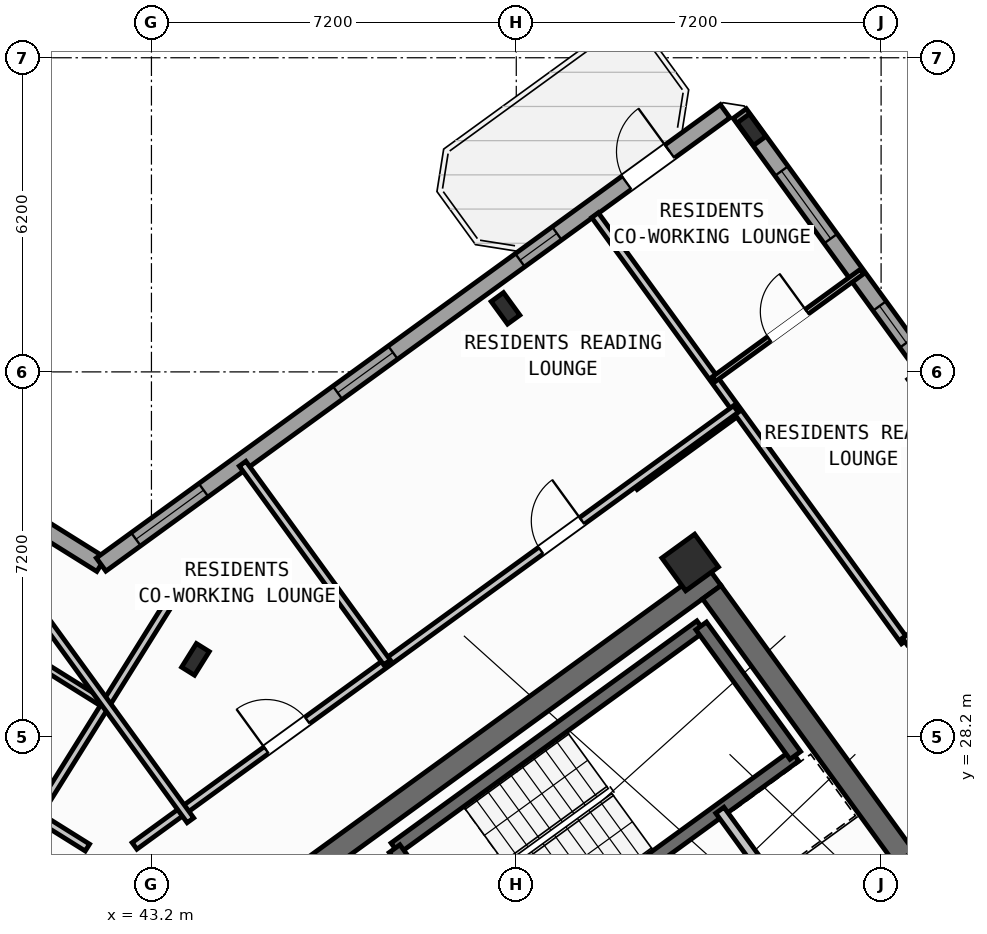
"""IFC4 building model, lengths in metres.
Left out: names, types, materials, properties, quantities, classifications, styles, units other than length and angle.
Written with IfcOpenShell. Run it as: python <this file> out.ifc"""

import sys

from ifc_helpers import new_model, si_unit, direction, frame, frame_2d, origin, origin_2d, place, context, subcontext, project, spatial, rectangle, hollow_rectangle, i_section, extrude, source, transform, mapped, element, fill, save


model = new_model("IFC4")
c1 = context("Model", 3, precision=1e-05, world=origin(), true_north=direction((0.0, 1.0)))
c2 = subcontext(c1, "Body", "Model", "MODEL_VIEW")
j1 = project(units=[si_unit("LENGTHUNIT", "METRE"), si_unit("PLANEANGLEUNIT", "RADIAN")], contexts=[c1])
p1 = place(None, origin())
s1 = spatial("IfcSite", under=j1, at=p1, CompositionType="ELEMENT")
p2 = place(p1, origin())
s2 = spatial("IfcBuilding", under=s1, at=p2, CompositionType="ELEMENT")
p3 = place(p2, frame((0.0, 0.0, 207.6)))
s3 = spatial("IfcBuildingStorey", under=s2, at=p3, CompositionType="ELEMENT", Elevation=207.6)
p4 = place(p3, frame((44.406, 24.172, 0.0), z_axis=(0.0, 0.0, 1.0), x_axis=(0.809012867805, 0.587790931986, 0.0)))
e1 = element("IfcWall", 1, at=p4, inside=s3, PredefinedType="SHEAR", context=c2, shape_type="SweptSolid", body=[
    extrude(rectangle(XDim=12.24, YDim=0.45, at=frame_2d((6.12, 0.0))), origin(), (0.0, 0.0, 1.0), 3.35),
])
p5 = place(p3, frame((58.064, 25.813, 0.0), z_axis=(0.0, 0.0, 1.0), x_axis=(-0.587774812919, 0.809024578921, 0.0)))
e2 = element("IfcWall", 2, at=p5, inside=s3, PredefinedType="SHEAR", context=c2, shape_type="SweptSolid", body=[
    extrude(rectangle(XDim=6.475, YDim=0.45, at=frame_2d((3.238, 0.0))), origin(), (0.0, 0.0, 1.0), 3.35),
])
m1 = source(origin(), c2, "Body", "SweptSolid", [
    extrude(i_section(OverallWidth=0.3, OverallDepth=0.55, WebThickness=0.015, FlangeThickness=0.029, at=origin_2d()), origin(), (0.0, 0.0, 1.0), 3.6),
])
p6 = place(p3, frame((44.068, 29.726, 0.0), z_axis=(0.0, 0.0, 1.0), x_axis=(-0.848048096156, 0.529919264233, 0.0)))
e3 = element("IfcColumn", 3, at=p6, inside=s3, PredefinedType="COLUMN", context=c2, shape_type="MappedRepresentation", body=[
    mapped(m1, transform((0.0, 0.0, 0.0), scale=1.0)),
])
m2 = source(origin(), c2, "Body", "SweptSolid", [
    extrude(hollow_rectangle(XDim=0.8, YDim=0.8, WallThickness=0.032, at=origin_2d()), origin(), (0.0, 0.0, 1.0), 3.6),
])
p7 = place(p3, frame((53.832, 31.638, 0.0), z_axis=(0.0, 0.0, 1.0), x_axis=(0.809016994375, 0.587785252292, 0.0)))
e4 = element("IfcColumn", 4, at=p7, inside=s3, PredefinedType="COLUMN", context=c2, shape_type="MappedRepresentation", body=[
    mapped(m2, transform((0.0, 0.0, 0.0), scale=1.0)),
])
for number, where, z_axis, x_axis in (
    (5, (50.188, 36.654, 0.0), (0.0, 0.0, 1.0), (0.809, 0.588, 0.0)),
    (6, (55.042, 40.181, 0.0), (0.0, 0.0, 1.0), (0.809, 0.588, 0.0)),
):
    element("IfcColumn", number, at=place(p3, frame(where, z_axis=z_axis, x_axis=x_axis)), inside=s3, PredefinedType="COLUMN", context=c2, shape_type="MappedRepresentation", body=[
        mapped(m1, transform((0.0, 0.0, 0.0), scale=1.0)),
    ])
p8 = place(p3, frame((17.424, 47.083, 0.0), z_axis=(0.0, 0.0, 1.0), x_axis=(0.848049927979, -0.529916332693, 0.0)))
e7 = element("IfcWall", 7, at=p8, inside=s3, PredefinedType="STANDARD", context=c2, shape_type="SweptSolid", body=[
    extrude(rectangle(XDim=29.223, YDim=0.32, at=frame_2d((14.612, 0.0))), origin(), (0.0, 0.0, 1.0), 3.35),
])
p9 = place(p8, frame((2.526, 0.0, 0.0)))
e8 = element("IfcOpeningElement", 8, at=p9, cuts=e7, PredefinedType="OPENING", context=c2, shape_type="SweptSolid", body=[
    extrude(rectangle(XDim=1.05, YDim=2.15, at=frame_2d((0.525, 1.075))), frame((0.0, 0.17, 0.0), z_axis=(0.0, -1.0, 0.0), x_axis=(1.0, 0.0, 0.0)), (0.0, 0.0, 1.0), 0.34),
])
p10 = place(p8, frame((0.653, 0.0, 0.9)))
e9 = element("IfcOpeningElement", 9, at=p10, cuts=e7, PredefinedType="OPENING", context=c2, shape_type="SweptSolid", body=[
    extrude(rectangle(XDim=1.35, YDim=1.45, at=frame_2d((0.675, 0.725))), frame((0.0, 0.17, 0.0), z_axis=(0.0, -1.0, 0.0), x_axis=(1.0, 0.0, 0.0)), (0.0, 0.0, 1.0), 0.34),
])
p11 = place(p8, frame((6.897, 0.0, 1.0)))
e10 = element("IfcOpeningElement", 10, at=p11, cuts=e7, PredefinedType="OPENING", context=c2, shape_type="SweptSolid", body=[
    extrude(rectangle(XDim=0.9, YDim=1.25, at=frame_2d((0.45, 0.625))), frame((0.0, 0.17, 0.0), z_axis=(0.0, -1.0, 0.0), x_axis=(1.0, 0.0, 0.0)), (0.0, 0.0, 1.0), 0.34),
])
p12 = place(p8, frame((9.602, 0.0, 0.95)))
e11 = element("IfcOpeningElement", 11, at=p12, cuts=e7, PredefinedType="OPENING", context=c2, shape_type="SweptSolid", body=[
    extrude(rectangle(XDim=1.95, YDim=1.35, at=frame_2d((0.975, 0.675))), frame((0.0, 0.17, 0.0), z_axis=(0.0, -1.0, 0.0), x_axis=(1.0, 0.0, 0.0)), (0.0, 0.0, 1.0), 0.34),
])
p13 = place(p8, frame((14.096, 0.0, 1.0)))
e12 = element("IfcOpeningElement", 12, at=p13, cuts=e7, PredefinedType="OPENING", context=c2, shape_type="SweptSolid", body=[
    extrude(rectangle(XDim=0.9, YDim=1.25, at=frame_2d((0.45, 0.625))), frame((0.0, 0.17, 0.0), z_axis=(0.0, -1.0, 0.0), x_axis=(1.0, 0.0, 0.0)), (0.0, 0.0, 1.0), 0.34),
])
p14 = place(p8, frame((17.254, 0.0, 1.0)))
e13 = element("IfcOpeningElement", 13, at=p14, cuts=e7, PredefinedType="OPENING", context=c2, shape_type="SweptSolid", body=[
    extrude(rectangle(XDim=0.9, YDim=1.25, at=frame_2d((0.45, 0.625))), frame((0.0, 0.17, 0.0), z_axis=(0.0, -1.0, 0.0), x_axis=(1.0, 0.0, 0.0)), (0.0, 0.0, 1.0), 0.34),
])
p15 = place(p8, frame((21.139, 0.0, 0.9)))
e14 = element("IfcOpeningElement", 14, at=p15, cuts=e7, PredefinedType="OPENING", context=c2, shape_type="SweptSolid", body=[
    extrude(rectangle(XDim=1.35, YDim=1.45, at=frame_2d((0.675, 0.725))), frame((0.0, 0.17, 0.0), z_axis=(0.0, -1.0, 0.0), x_axis=(1.0, 0.0, 0.0)), (0.0, 0.0, 1.0), 0.34),
])
p16 = place(p8, frame((25.778, 0.0, 0.9)))
e15 = element("IfcOpeningElement", 15, at=p16, cuts=e7, PredefinedType="OPENING", context=c2, shape_type="SweptSolid", body=[
    extrude(rectangle(XDim=1.35, YDim=1.45, at=frame_2d((0.675, 0.725))), frame((0.0, 0.17, 0.0), z_axis=(0.0, -1.0, 0.0), x_axis=(1.0, 0.0, 0.0)), (0.0, 0.0, 1.0), 0.34),
])
p17 = place(p3, frame((42.207, 31.597, 0.0), z_axis=(0.0, 0.0, 1.0), x_axis=(0.809020333377, 0.587780656523, 0.0)))
e16 = element("IfcWall", 16, at=p17, inside=s3, PredefinedType="STANDARD", context=c2, shape_type="SweptSolid", body=[
    extrude(rectangle(XDim=15.223, YDim=0.32, at=frame_2d((7.611, 0.0))), origin(), (0.0, 0.0, 1.0), 3.35),
])
p18 = place(p17, frame((12.82, 0.0, 0.0)))
e17 = element("IfcOpeningElement", 17, at=p18, cuts=e16, PredefinedType="OPENING", context=c2, shape_type="SweptSolid", body=[
    extrude(rectangle(XDim=1.05, YDim=2.15, at=frame_2d((0.525, 1.075))), frame((0.0, 0.17, 0.0), z_axis=(0.0, -1.0, 0.0), x_axis=(1.0, 0.0, 0.0)), (0.0, 0.0, 1.0), 0.34),
])
p19 = place(p17, frame((0.85, 0.0, 0.9)))
e18 = element("IfcOpeningElement", 18, at=p19, cuts=e16, PredefinedType="OPENING", context=c2, shape_type="SweptSolid", body=[
    extrude(rectangle(XDim=1.65, YDim=1.45, at=frame_2d((0.825, 0.725))), frame((0.0, 0.17, 0.0), z_axis=(0.0, -1.0, 0.0), x_axis=(1.0, 0.0, 0.0)), (0.0, 0.0, 1.0), 0.34),
])
p20 = place(p17, frame((5.769, 0.0, 0.9)))
e19 = element("IfcOpeningElement", 19, at=p20, cuts=e16, PredefinedType="OPENING", context=c2, shape_type="SweptSolid", body=[
    extrude(rectangle(XDim=1.35, YDim=1.45, at=frame_2d((0.675, 0.725))), frame((0.0, 0.17, 0.0), z_axis=(0.0, -1.0, 0.0), x_axis=(1.0, 0.0, 0.0)), (0.0, 0.0, 1.0), 0.34),
])
p21 = place(p17, frame((10.219, 0.0, 1.0)))
e20 = element("IfcOpeningElement", 20, at=p21, cuts=e16, PredefinedType="OPENING", context=c2, shape_type="SweptSolid", body=[
    extrude(rectangle(XDim=0.9, YDim=1.25, at=frame_2d((0.45, 0.625))), frame((0.0, 0.17, 0.0), z_axis=(0.0, -1.0, 0.0), x_axis=(1.0, 0.0, 0.0)), (0.0, 0.0, 1.0), 0.34),
])
p22 = place(p3, frame((54.81, 40.5, 0.0), z_axis=(0.0, 0.0, 1.0), x_axis=(0.587783625747, -0.809018176127, 0.0)))
e21 = element("IfcWall", 21, at=p22, inside=s3, PredefinedType="STANDARD", context=c2, shape_type="SweptSolid", body=[
    extrude(rectangle(XDim=21.587, YDim=0.32, at=frame_2d((10.794, 0.0))), origin(), (0.0, 0.0, 1.0), 2.825),
])
p23 = place(p22, frame((1.403, 0.0, 0.9)))
e22 = element("IfcOpeningElement", 22, at=p23, cuts=e21, PredefinedType="OPENING", context=c2, shape_type="SweptSolid", body=[
    extrude(rectangle(XDim=1.65, YDim=1.45, at=frame_2d((0.825, 0.725))), frame((0.0, 0.17, 0.0), z_axis=(0.0, -1.0, 0.0), x_axis=(1.0, 0.0, 0.0)), (0.0, 0.0, 1.0), 0.34),
])
p24 = place(p22, frame((4.695, 0.0, 1.0)))
e23 = element("IfcOpeningElement", 23, at=p24, cuts=e21, PredefinedType="OPENING", context=c2, shape_type="SweptSolid", body=[
    extrude(rectangle(XDim=0.9, YDim=1.25, at=frame_2d((0.45, 0.625))), frame((0.0, 0.17, 0.0), z_axis=(0.0, -1.0, 0.0), x_axis=(1.0, 0.0, 0.0)), (0.0, 0.0, 1.0), 0.34),
])
p25 = place(p22, frame((7.604, 0.0, 0.95)))
e24 = element("IfcOpeningElement", 24, at=p25, cuts=e21, PredefinedType="OPENING", context=c2, shape_type="SweptSolid", body=[
    extrude(rectangle(XDim=1.95, YDim=1.35, at=frame_2d((0.975, 0.675))), frame((0.0, 0.17, 0.0), z_axis=(0.0, -1.0, 0.0), x_axis=(1.0, 0.0, 0.0)), (0.0, 0.0, 1.0), 0.34),
])
p26 = place(p22, frame((15.692, 0.0, 1.0)))
e25 = element("IfcOpeningElement", 25, at=p26, cuts=e21, PredefinedType="OPENING", context=c2, shape_type="SweptSolid", body=[
    extrude(rectangle(XDim=0.9, YDim=1.25, at=frame_2d((0.45, 0.625))), frame((0.0, 0.17, 0.0), z_axis=(0.0, -1.0, 0.0), x_axis=(1.0, 0.0, 0.0)), (0.0, 0.0, 1.0), 0.34),
])
p27 = place(p22, frame((18.872, 0.0, 0.9)))
e26 = element("IfcOpeningElement", 26, at=p27, cuts=e21, PredefinedType="OPENING", context=c2, shape_type="SweptSolid", body=[
    extrude(rectangle(XDim=1.35, YDim=1.45, at=frame_2d((0.675, 0.725))), frame((0.0, 0.17, 0.0), z_axis=(0.0, -1.0, 0.0), x_axis=(1.0, 0.0, 0.0)), (0.0, 0.0, 1.0), 0.34),
])
p28 = place(p3, frame((48.006, 25.996, 0.0), z_axis=(0.0, 0.0, 1.0), x_axis=(0.80901903764, 0.587782439969, 0.0)))
e27 = element("IfcWall", 27, at=p28, inside=s3, PredefinedType="SHEAR", context=c2, shape_type="SweptSolid", body=[
    extrude(rectangle(XDim=7.46, YDim=0.26, at=frame_2d((3.73, 0.0))), origin(), (0.0, 0.0, 1.0), 3.35),
])
p29 = place(p3, frame((49.863, 23.44, 0.0), z_axis=(0.0, 0.0, 1.0), x_axis=(0.809003474932, 0.587803859759, 0.0)))
e28 = element("IfcWall", 28, at=p29, inside=s3, PredefinedType="SHEAR", context=c2, shape_type="SweptSolid", body=[
    extrude(rectangle(XDim=7.46, YDim=0.26, at=frame_2d((3.73, 0.0))), origin(), (0.0, 0.0, 1.0), 3.35),
])
p30 = place(p29, frame((0.36, 0.0, 0.0)))
e29 = element("IfcOpeningElement", 29, at=p30, cuts=e28, PredefinedType="OPENING", context=c2, shape_type="SweptSolid", body=[
    extrude(rectangle(XDim=0.86, YDim=2.05, at=frame_2d((0.43, 1.025))), frame((0.0, 0.14, 0.0), z_axis=(0.0, -1.0, 0.0), x_axis=(1.0, 0.0, 0.0)), (0.0, 0.0, 1.0), 0.28),
])
p31 = place(p3, frame((49.855, 23.434, 0.0), z_axis=(0.0, 0.0, 1.0), x_axis=(-0.58776738483, 0.809029975545, 0.0)))
e30 = element("IfcWall", 30, at=p31, inside=s3, PredefinedType="SHEAR", context=c2, shape_type="SweptSolid", body=[
    extrude(rectangle(XDim=3.16, YDim=0.26, at=frame_2d((1.58, 0.0))), origin(), (0.0, 0.0, 1.0), 3.35),
])
p32 = place(p3, frame((55.906, 27.831, 0.0), z_axis=(0.0, 0.0, 1.0), x_axis=(-0.587804123638, 0.809003283204, 0.0)))
e31 = element("IfcWall", 31, at=p32, inside=s3, PredefinedType="SHEAR", context=c2, shape_type="SweptSolid", body=[
    extrude(rectangle(XDim=3.16, YDim=0.26, at=frame_2d((1.58, 0.0))), origin(), (0.0, 0.0, 1.0), 3.35),
])
p33 = place(p3, frame((56.111, 24.419, 0.0), z_axis=(0.0, 0.0, 1.0), x_axis=(-0.58777848983, 0.809021907548, 0.0)))
e32 = element("IfcWall", 32, at=p33, inside=s3, PredefinedType="STANDARD", context=c2, shape_type="SweptSolid", body=[
    extrude(rectangle(XDim=2.88, YDim=0.2, at=frame_2d((1.44, 0.0))), origin(), (0.0, 0.0, 1.0), 3.34),
])
p34 = place(p3, frame((41.936, 26.012, 0.0), z_axis=(0.0, 0.0, 1.0), x_axis=(-0.848051154596, 0.529914369676, 0.0)))
e33 = element("IfcWall", 33, at=p34, inside=s3, PredefinedType="PARTITIONING", context=c2, shape_type="SweptSolid", body=[
    extrude(rectangle(XDim=15.57, YDim=0.16, at=frame_2d((7.785, 0.0))), origin(), (0.0, 0.0, 1.0), 3.34),
])
p35 = place(p34, frame((10.83, 0.0, 0.0)))
e34 = element("IfcOpeningElement", 34, at=p35, cuts=e33, PredefinedType="OPENING", context=c2, shape_type="SweptSolid", body=[
    extrude(rectangle(XDim=1.0, YDim=2.1, at=frame_2d((0.5, 1.05))), frame((0.0, 0.09, 0.0), z_axis=(0.0, -1.0, 0.0), x_axis=(1.0, 0.0, 0.0)), (0.0, 0.0, 1.0), 0.18),
])
p36 = place(p3, frame((43.704, 31.086, 0.0), z_axis=(0.0, 0.0, 1.0), x_axis=(-0.529906828443, -0.848055866774, 0.0)))
e35 = element("IfcWall", 35, at=p36, inside=s3, PredefinedType="PARTITIONING", context=c2, shape_type="SweptSolid", body=[
    extrude(rectangle(XDim=5.48, YDim=0.16, at=frame_2d((2.74, 0.0))), origin(), (0.0, 0.0, 1.0), 3.34),
])
p37 = place(p3, frame((42.226, 28.873, 0.0), z_axis=(0.0, 0.0, 1.0), x_axis=(-0.848049134363, 0.529917602752, 0.0)))
e36 = element("IfcWall", 36, at=p37, inside=s3, PredefinedType="PLUMBINGWALL", context=c2, shape_type="SweptSolid", body=[
    extrude(rectangle(XDim=14.3, YDim=0.14, at=frame_2d((7.15, 0.0))), origin(), (0.0, 0.0, 1.0), 3.34),
])
p38 = place(p37, frame((9.57, 0.0, 0.0)))
e37 = element("IfcOpeningElement", 37, at=p38, cuts=e36, PredefinedType="OPENING", context=c2, shape_type="SweptSolid", body=[
    extrude(rectangle(XDim=0.92, YDim=2.08, at=frame_2d((0.46, 1.04))), frame((0.0, 0.08, 0.0), z_axis=(0.0, -1.0, 0.0), x_axis=(1.0, 0.0, 0.0)), (0.0, 0.0, 1.0), 0.16),
])
p39 = place(p3, frame((52.739, 33.143, 0.0), z_axis=(0.0, 0.0, 1.0), x_axis=(0.809000999347, 0.58780726693, 0.0)))
e38 = element("IfcWall", 38, at=p39, inside=s3, PredefinedType="PARTITIONING", context=c2, shape_type="SweptSolid", body=[
    extrude(rectangle(XDim=2.51, YDim=0.16, at=frame_2d((1.255, 0.0))), origin(), (0.0, 0.0, 1.0), 3.34),
])
p40 = place(p3, frame((58.067, 30.08, 0.0), z_axis=(0.0, 0.0, 1.0), x_axis=(-0.587787785243, 0.809015154073, 0.0)))
e39 = element("IfcWall", 39, at=p40, inside=s3, PredefinedType="PARTITIONING", context=c2, shape_type="SweptSolid", body=[
    extrude(rectangle(XDim=10.4, YDim=0.16, at=frame_2d((5.2, 0.0))), origin(), (0.0, 0.0, 1.0), 3.34),
])
p41 = place(p3, frame((58.067, 30.08, 0.0), z_axis=(0.0, 0.0, 1.0), x_axis=(0.809012309495, 0.587791700422, 0.0)))
e40 = element("IfcWall", 40, at=p41, inside=s3, PredefinedType="PARTITIONING", context=c2, shape_type="SweptSolid", body=[
    extrude(rectangle(XDim=3.63, YDim=0.16, at=frame_2d((1.815, 0.0))), origin(), (0.0, 0.0, 1.0), 3.34),
])
p42 = place(p41, frame((1.305, 0.0, 0.0)))
e41 = element("IfcOpeningElement", 41, at=p42, cuts=e40, PredefinedType="OPENING", context=c2, shape_type="SweptSolid", body=[
    extrude(rectangle(XDim=1.0, YDim=2.1, at=frame_2d((0.5, 1.05))), frame((0.0, 0.09, 0.0), z_axis=(0.0, -1.0, 0.0), x_axis=(1.0, 0.0, 0.0)), (0.0, 0.0, 1.0), 0.18),
])
p43 = place(p3, frame((54.304, 35.259, 0.0), z_axis=(0.0, 0.0, 1.0), x_axis=(0.809005039917, 0.58780170584, 0.0)))
e42 = element("IfcWall", 42, at=p43, inside=s3, PredefinedType="PARTITIONING", context=c2, shape_type="SweptSolid", body=[
    extrude(rectangle(XDim=3.61, YDim=0.11, at=frame_2d((1.805, 0.0))), origin(), (0.0, 0.0, 1.0), 3.34),
])
p44 = place(p43, frame((1.345, 0.0, 0.0)))
e43 = element("IfcOpeningElement", 43, at=p44, cuts=e42, PredefinedType="OPENING", context=c2, shape_type="SweptSolid", body=[
    extrude(rectangle(XDim=0.92, YDim=2.08, at=frame_2d((0.46, 1.04))), frame((0.0, 0.065, 0.0), z_axis=(0.0, -1.0, 0.0), x_axis=(1.0, 0.0, 0.0)), (0.0, 0.0, 1.0), 0.13),
])
p45 = place(p3, frame((42.866, 26.044, 0.0), z_axis=(0.0, 0.0, 1.0), x_axis=(0.809020254154, 0.587780765566, 0.0)))
e44 = element("IfcWall", 44, at=p45, inside=s3, PredefinedType="PARTITIONING", context=c2, shape_type="SweptSolid", body=[
    extrude(rectangle(XDim=14.67, YDim=0.16, at=frame_2d((7.335, 0.0))), origin(), (0.0, 0.0, 1.0), 3.34),
])
p46 = place(p45, frame((3.215, 0.0, 0.0)))
e45 = element("IfcOpeningElement", 45, at=p46, cuts=e44, PredefinedType="OPENING", context=c2, shape_type="SweptSolid", body=[
    extrude(rectangle(XDim=1.0, YDim=2.1, at=frame_2d((0.5, 1.05))), frame((0.0, 0.09, 0.0), z_axis=(0.0, -1.0, 0.0), x_axis=(1.0, 0.0, 0.0)), (0.0, 0.0, 1.0), 0.18),
])
p47 = place(p45, frame((9.915, 0.0, 0.0)))
e46 = element("IfcOpeningElement", 46, at=p47, cuts=e44, PredefinedType="OPENING", context=c2, shape_type="SweptSolid", body=[
    extrude(rectangle(XDim=1.0, YDim=2.1, at=frame_2d((0.5, 1.05))), frame((0.0, 0.09, 0.0), z_axis=(0.0, -1.0, 0.0), x_axis=(1.0, 0.0, 0.0)), (0.0, 0.0, 1.0), 0.18),
])
p48 = place(p3, frame((43.969, 26.55, 0.0), z_axis=(0.0, 0.0, 1.0), x_axis=(-0.587776919386, 0.80902304852, 0.0)))
e47 = element("IfcWall", 47, at=p48, inside=s3, PredefinedType="PARTITIONING", context=c2, shape_type="SweptSolid", body=[
    extrude(rectangle(XDim=5.48, YDim=0.16, at=frame_2d((2.74, 0.0))), origin(), (0.0, 0.0, 1.0), 3.34),
])
p49 = place(p3, frame((47.849, 29.665, 0.0), z_axis=(0.0, 0.0, 1.0), x_axis=(-0.587785532001, 0.809016791155, 0.0)))
e48 = element("IfcWall", 48, at=p49, inside=s3, PredefinedType="PARTITIONING", context=c2, shape_type="SweptSolid", body=[
    extrude(rectangle(XDim=4.85, YDim=0.16, at=frame_2d((2.425, 0.0))), origin(), (0.0, 0.0, 1.0), 3.34),
])
m3 = source(origin(), c2, "Body", "SweptSolid", [
    extrude(rectangle(XDim=1.05, YDim=2.15, at=frame_2d((0.525, 1.075))), frame((0.0, 0.025, 0.0), z_axis=(0.0, -1.0, 0.0), x_axis=(1.0, 0.0, 0.0)), (0.0, 0.0, 1.0), 0.05),
])
p50 = place(p18, origin())
e49 = element("IfcDoor", 49, at=p50, inside=s3, OperationType="SINGLE_SWING_RIGHT", PredefinedType="DOOR", context=c2, shape_type="MappedRepresentation", body=[
    mapped(m3, transform((0.0, 0.0, 0.0), scale=1.0)),
])
fill(e17, e49)
m4 = source(origin(), c2, "Body", "SweptSolid", [
    extrude(rectangle(XDim=1.65, YDim=1.45, at=frame_2d((0.825, 0.725))), frame((0.0, 0.03, 0.0), z_axis=(0.0, -1.0, 0.0), x_axis=(1.0, 0.0, 0.0)), (0.0, 0.0, 1.0), 0.06),
])
p51 = place(p19, origin())
e50 = element("IfcWindow", 50, at=p51, inside=s3, PartitioningType="SINGLE_PANEL", PredefinedType="WINDOW", context=c2, shape_type="MappedRepresentation", body=[
    mapped(m4, transform((0.0, 0.0, 0.0), scale=1.0)),
])
fill(e18, e50)
m5 = source(origin(), c2, "Body", "SweptSolid", [
    extrude(rectangle(XDim=1.35, YDim=1.45, at=frame_2d((0.675, 0.725))), frame((0.0, 0.03, 0.0), z_axis=(0.0, -1.0, 0.0), x_axis=(1.0, 0.0, 0.0)), (0.0, 0.0, 1.0), 0.06),
])
p52 = place(p20, origin())
e51 = element("IfcWindow", 51, at=p52, inside=s3, PartitioningType="SINGLE_PANEL", PredefinedType="WINDOW", context=c2, shape_type="MappedRepresentation", body=[
    mapped(m5, transform((0.0, 0.0, 0.0), scale=1.0)),
])
fill(e19, e51)
m6 = source(origin(), c2, "Body", "SweptSolid", [
    extrude(rectangle(XDim=0.9, YDim=1.25, at=frame_2d((0.45, 0.625))), frame((0.0, 0.03, 0.0), z_axis=(0.0, -1.0, 0.0), x_axis=(1.0, 0.0, 0.0)), (0.0, 0.0, 1.0), 0.06),
])
p53 = place(p21, origin())
e52 = element("IfcWindow", 52, at=p53, inside=s3, PartitioningType="SINGLE_PANEL", PredefinedType="WINDOW", context=c2, shape_type="MappedRepresentation", body=[
    mapped(m6, transform((0.0, 0.0, 0.0), scale=1.0)),
])
fill(e20, e52)
p54 = place(p23, origin())
e53 = element("IfcWindow", 53, at=p54, inside=s3, PartitioningType="SINGLE_PANEL", PredefinedType="WINDOW", context=c2, shape_type="MappedRepresentation", body=[
    mapped(m4, transform((0.0, 0.0, 0.0), scale=1.0)),
])
fill(e22, e53)
p55 = place(p24, origin())
e54 = element("IfcWindow", 54, at=p55, inside=s3, PartitioningType="SINGLE_PANEL", PredefinedType="WINDOW", context=c2, shape_type="MappedRepresentation", body=[
    mapped(m6, transform((0.0, 0.0, 0.0), scale=1.0)),
])
fill(e23, e54)
m7 = source(origin(), c2, "Body", "SweptSolid", [
    extrude(rectangle(XDim=0.92, YDim=2.08, at=frame_2d((0.46, 1.04))), frame((0.0, 0.025, 0.0), z_axis=(0.0, -1.0, 0.0), x_axis=(1.0, 0.0, 0.0)), (0.0, 0.0, 1.0), 0.05),
])
p56 = place(p44, origin())
e55 = element("IfcDoor", 55, at=p56, inside=s3, OperationType="SINGLE_SWING_RIGHT", PredefinedType="DOOR", context=c2, shape_type="MappedRepresentation", body=[
    mapped(m7, transform((0.0, 0.0, 0.0), scale=1.0)),
])
fill(e43, e55)
m8 = source(origin(), c2, "Body", "SweptSolid", [
    extrude(rectangle(XDim=1.0, YDim=2.1, at=frame_2d((0.5, 1.05))), frame((0.0, 0.025, 0.0), z_axis=(0.0, -1.0, 0.0), x_axis=(1.0, 0.0, 0.0)), (0.0, 0.0, 1.0), 0.05),
])
p57 = place(p46, origin())
e56 = element("IfcDoor", 56, at=p57, inside=s3, OperationType="SINGLE_SWING_LEFT", PredefinedType="DOOR", context=c2, shape_type="MappedRepresentation", body=[
    mapped(m8, transform((0.0, 0.0, 0.0), scale=1.0)),
])
fill(e45, e56)
p58 = place(p47, origin())
e57 = element("IfcDoor", 57, at=p58, inside=s3, OperationType="SINGLE_SWING_RIGHT", PredefinedType="DOOR", context=c2, shape_type="MappedRepresentation", body=[
    mapped(m8, transform((0.0, 0.0, 0.0), scale=1.0)),
])
fill(e46, e57)
save(model, sys.argv[1])
